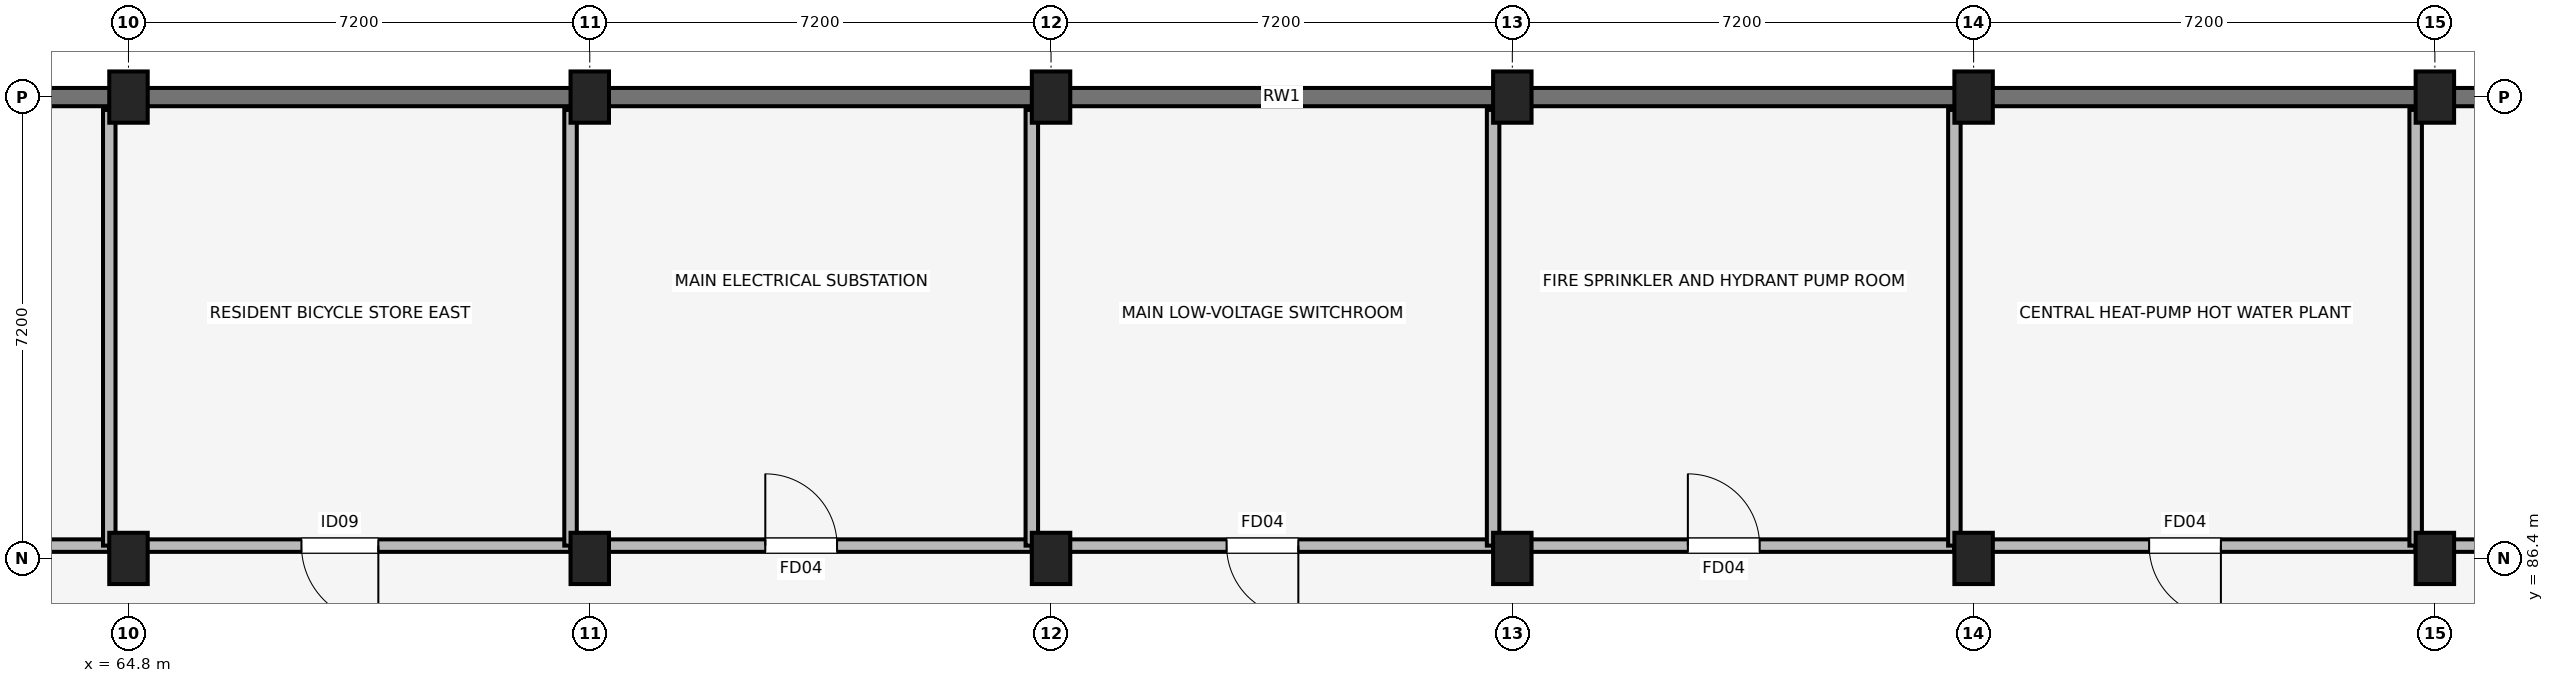
"""IFC4 building model, lengths in metres.
Left out: names, types, materials, properties, quantities, classifications, styles, units other than length and angle.
Written with IfcOpenShell. Run it as: python <this file> out.ifc"""

import sys

from ifc_helpers import new_model, si_unit, direction, frame, frame_2d, origin, origin_2d, place, context, subcontext, project, spatial, rectangle, extrude, element, fill, save


model = new_model("IFC4")
c1 = context("Model", 3, precision=1e-05, world=origin(), true_north=direction((0.0, 1.0)))
c2 = subcontext(c1, "Body", "Model", "MODEL_VIEW")
j1 = project(units=[si_unit("LENGTHUNIT", "METRE"), si_unit("PLANEANGLEUNIT", "RADIAN")], contexts=[c1])
p1 = place(None, origin())
s1 = spatial("IfcSite", under=j1, at=p1, CompositionType="ELEMENT")
p2 = place(p1, origin())
s2 = spatial("IfcBuilding", under=s1, at=p2, CompositionType="ELEMENT")
p3 = place(p2, frame((0.0, 0.0, -3.6)))
s3 = spatial("IfcBuildingStorey", under=s2, at=p3, CompositionType="ELEMENT", Elevation=-3.6)
p4 = place(p3, frame((-0.143, 93.6, 0.0), z_axis=(0.0, 0.0, 1.0), x_axis=(1.0, 0.0, 0.0)))
e1 = element("IfcWall", 1, at=p4, inside=s3, PredefinedType="USERDEFINED", context=c2, shape_type="SweptSolid", body=[
    extrude(rectangle(XDim=165.885, YDim=0.285, at=frame_2d((82.942, 0.0))), origin(), (0.0, 0.0, 1.0), 3.6),
])
for number, where, z_axis, x_axis in (
    (2, (64.8, 86.4, -0.26), (0.0, 0.0, 1.0), (1.0, 0.0, 0.0)),
    (3, (64.8, 93.6, -0.26), (0.0, 0.0, 1.0), (1.0, 0.0, 0.0)),
    (4, (72.0, 86.4, -0.26), (0.0, 0.0, 1.0), (1.0, 0.0, 0.0)),
    (5, (72.0, 93.6, -0.26), (0.0, 0.0, 1.0), (1.0, 0.0, 0.0)),
    (6, (79.2, 86.4, -0.26), (0.0, 0.0, 1.0), (1.0, 0.0, 0.0)),
    (7, (79.2, 93.6, -0.26), (0.0, 0.0, 1.0), (1.0, 0.0, 0.0)),
    (8, (86.4, 86.4, -0.26), (0.0, 0.0, 1.0), (1.0, 0.0, 0.0)),
    (9, (86.4, 93.6, -0.26), (0.0, 0.0, 1.0), (1.0, 0.0, 0.0)),
    (10, (93.6, 86.4, -0.26), (0.0, 0.0, 1.0), (1.0, 0.0, 0.0)),
    (11, (93.6, 93.6, -0.26), (0.0, 0.0, 1.0), (1.0, 0.0, 0.0)),
    (12, (100.8, 86.4, -0.26), (0.0, 0.0, 1.0), (1.0, 0.0, 0.0)),
    (13, (100.8, 93.6, -0.26), (0.0, 0.0, 1.0), (1.0, 0.0, 0.0)),
):
    element("IfcColumn", number, at=place(p3, frame(where, z_axis=z_axis, x_axis=x_axis)), inside=s3, PredefinedType="COLUMN", context=c2, shape_type="SweptSolid", body=[
        extrude(rectangle(XDim=0.6, YDim=0.8, at=origin_2d()), origin(), (0.0, 0.0, 1.0), 3.86),
    ])
p5 = place(p3, frame((58.2, 86.6, 0.0), z_axis=(0.0, 0.0, 1.0), x_axis=(1.0, 0.0, 0.0)))
e14 = element("IfcWall", 14, at=p5, inside=s3, PredefinedType="PARTITIONING", context=c2, shape_type="SweptSolid", body=[
    extrude(rectangle(XDim=6.3, YDim=0.195, at=frame_2d((3.15, 0.0))), origin(), (0.0, 0.0, 1.0), 2.28),
])
p6 = place(p5, frame((2.55, 0.0, 0.0)))
e15 = element("IfcOpeningElement", 15, at=p6, cuts=e14, PredefinedType="OPENING", context=c2, shape_type="SweptSolid", body=[
    extrude(rectangle(XDim=1.2, YDim=2.18, at=frame_2d((0.6, 1.09))), frame((0.0, 0.107, 0.0), z_axis=(0.0, -1.0, 0.0), x_axis=(1.0, 0.0, 0.0)), (0.0, 0.0, 1.0), 0.215),
])
p7 = place(p3, frame((64.5, 86.6, 0.0), z_axis=(0.0, 0.0, 1.0), x_axis=(1.0, 0.0, 0.0)))
e16 = element("IfcWall", 16, at=p7, inside=s3, PredefinedType="PARTITIONING", context=c2, shape_type="SweptSolid", body=[
    extrude(rectangle(XDim=7.2, YDim=0.195, at=frame_2d((3.6, 0.0))), origin(), (0.0, 0.0, 1.0), 2.28),
])
p8 = place(p7, frame((4.2, 0.0, 0.0), z_axis=(0.0, 0.0, 1.0), x_axis=(-1.0, 0.0, 0.0)))
e17 = element("IfcOpeningElement", 17, at=p8, cuts=e16, PredefinedType="OPENING", context=c2, shape_type="SweptSolid", body=[
    extrude(rectangle(XDim=1.2, YDim=2.18, at=frame_2d((0.6, 1.09))), frame((0.0, 0.107, 0.0), z_axis=(0.0, -1.0, 0.0), x_axis=(1.0, 0.0, 0.0)), (0.0, 0.0, 1.0), 0.215),
])
p9 = place(p3, frame((71.7, 86.6, 0.0), z_axis=(0.0, 0.0, 1.0), x_axis=(1.0, 0.0, 0.0)))
e18 = element("IfcWall", 18, at=p9, inside=s3, PredefinedType="PARTITIONING", context=c2, shape_type="SweptSolid", body=[
    extrude(rectangle(XDim=7.2, YDim=0.195, at=frame_2d((3.6, 0.0))), origin(), (0.0, 0.0, 1.0), 2.25),
])
p10 = place(p9, frame((3.04, 0.0, 0.0)))
e19 = element("IfcOpeningElement", 19, at=p10, cuts=e18, PredefinedType="OPENING", context=c2, shape_type="SweptSolid", body=[
    extrude(rectangle(XDim=1.12, YDim=2.15, at=frame_2d((0.56, 1.075))), frame((0.0, 0.107, 0.0), z_axis=(0.0, -1.0, 0.0), x_axis=(1.0, 0.0, 0.0)), (0.0, 0.0, 1.0), 0.215),
])
p11 = place(p3, frame((78.9, 86.6, 0.0), z_axis=(0.0, 0.0, 1.0), x_axis=(1.0, 0.0, 0.0)))
e20 = element("IfcWall", 20, at=p11, inside=s3, PredefinedType="PARTITIONING", context=c2, shape_type="SweptSolid", body=[
    extrude(rectangle(XDim=7.2, YDim=0.195, at=frame_2d((3.6, 0.0))), origin(), (0.0, 0.0, 1.0), 2.25),
])
p12 = place(p11, frame((4.16, 0.0, 0.0), z_axis=(0.0, 0.0, 1.0), x_axis=(-1.0, 0.0, 0.0)))
e21 = element("IfcOpeningElement", 21, at=p12, cuts=e20, PredefinedType="OPENING", context=c2, shape_type="SweptSolid", body=[
    extrude(rectangle(XDim=1.12, YDim=2.15, at=frame_2d((0.56, 1.075))), frame((0.0, 0.107, 0.0), z_axis=(0.0, -1.0, 0.0), x_axis=(1.0, 0.0, 0.0)), (0.0, 0.0, 1.0), 0.215),
])
p13 = place(p3, frame((86.1, 86.6, 0.0), z_axis=(0.0, 0.0, 1.0), x_axis=(1.0, 0.0, 0.0)))
e22 = element("IfcWall", 22, at=p13, inside=s3, PredefinedType="PARTITIONING", context=c2, shape_type="SweptSolid", body=[
    extrude(rectangle(XDim=7.2, YDim=0.195, at=frame_2d((3.6, 0.0))), origin(), (0.0, 0.0, 1.0), 2.25),
])
p14 = place(p13, frame((3.04, 0.0, 0.0)))
e23 = element("IfcOpeningElement", 23, at=p14, cuts=e22, PredefinedType="OPENING", context=c2, shape_type="SweptSolid", body=[
    extrude(rectangle(XDim=1.12, YDim=2.15, at=frame_2d((0.56, 1.075))), frame((0.0, 0.107, 0.0), z_axis=(0.0, -1.0, 0.0), x_axis=(1.0, 0.0, 0.0)), (0.0, 0.0, 1.0), 0.215),
])
p15 = place(p3, frame((93.3, 86.6, 0.0), z_axis=(0.0, 0.0, 1.0), x_axis=(1.0, 0.0, 0.0)))
e24 = element("IfcWall", 24, at=p15, inside=s3, PredefinedType="PARTITIONING", context=c2, shape_type="SweptSolid", body=[
    extrude(rectangle(XDim=7.2, YDim=0.195, at=frame_2d((3.6, 0.0))), origin(), (0.0, 0.0, 1.0), 2.25),
])
p16 = place(p15, frame((4.16, 0.0, 0.0), z_axis=(0.0, 0.0, 1.0), x_axis=(-1.0, 0.0, 0.0)))
e25 = element("IfcOpeningElement", 25, at=p16, cuts=e24, PredefinedType="OPENING", context=c2, shape_type="SweptSolid", body=[
    extrude(rectangle(XDim=1.12, YDim=2.15, at=frame_2d((0.56, 1.075))), frame((0.0, 0.107, 0.0), z_axis=(0.0, -1.0, 0.0), x_axis=(1.0, 0.0, 0.0)), (0.0, 0.0, 1.0), 0.215),
])
p17 = place(p3, frame((100.5, 86.6, 0.0), z_axis=(0.0, 0.0, 1.0), x_axis=(1.0, 0.0, 0.0)))
e26 = element("IfcWall", 26, at=p17, inside=s3, PredefinedType="PARTITIONING", context=c2, shape_type="SweptSolid", body=[
    extrude(rectangle(XDim=6.9, YDim=0.195, at=frame_2d((3.45, 0.0))), origin(), (0.0, 0.0, 1.0), 2.25),
])
p18 = place(p17, frame((2.89, 0.0, 0.0)))
e27 = element("IfcOpeningElement", 27, at=p18, cuts=e26, PredefinedType="OPENING", context=c2, shape_type="SweptSolid", body=[
    extrude(rectangle(XDim=1.12, YDim=2.15, at=frame_2d((0.56, 1.075))), frame((0.0, 0.107, 0.0), z_axis=(0.0, -1.0, 0.0), x_axis=(1.0, 0.0, 0.0)), (0.0, 0.0, 1.0), 0.215),
])
for number, where, z_axis, x_axis in (
    (28, (64.5, 86.6, 0.0), (0.0, 0.0, 1.0), (0.0, 1.0, 0.0)),
    (29, (71.7, 86.6, 0.0), (0.0, 0.0, 1.0), (0.0, 1.0, 0.0)),
    (30, (78.9, 86.6, 0.0), (0.0, 0.0, 1.0), (0.0, 1.0, 0.0)),
    (31, (86.1, 86.6, 0.0), (0.0, 0.0, 1.0), (0.0, 1.0, 0.0)),
    (32, (93.3, 86.6, 0.0), (0.0, 0.0, 1.0), (0.0, 1.0, 0.0)),
    (33, (100.5, 86.6, 0.0), (0.0, 0.0, 1.0), (0.0, 1.0, 0.0)),
):
    element("IfcWall", number, at=place(p3, frame(where, z_axis=z_axis, x_axis=x_axis)), inside=s3, PredefinedType="PARTITIONING", context=c2, shape_type="SweptSolid", body=[
        extrude(rectangle(XDim=6.8, YDim=0.195, at=frame_2d((3.4, 0.0))), origin(), (0.0, 0.0, 1.0), 2.2),
    ])
p19 = place(p8, origin())
e34 = element("IfcDoor", 34, at=p19, inside=s3, OperationType="SINGLE_SWING_RIGHT", PredefinedType="DOOR", context=c2, shape_type="SweptSolid", body=[
    extrude(rectangle(XDim=1.2, YDim=2.18, at=frame_2d((0.6, 1.09))), frame((0.0, 0.025, 0.0), z_axis=(0.0, -1.0, 0.0), x_axis=(1.0, 0.0, 0.0)), (0.0, 0.0, 1.0), 0.05),
])
fill(e17, e34)
p20 = place(p10, origin())
e35 = element("IfcDoor", 35, at=p20, inside=s3, OperationType="SINGLE_SWING_LEFT", PredefinedType="DOOR", context=c2, shape_type="SweptSolid", body=[
    extrude(rectangle(XDim=1.12, YDim=2.15, at=frame_2d((0.56, 1.075))), frame((0.0, 0.025, 0.0), z_axis=(0.0, -1.0, 0.0), x_axis=(1.0, 0.0, 0.0)), (0.0, 0.0, 1.0), 0.05),
])
fill(e19, e35)
p21 = place(p12, origin())
e36 = element("IfcDoor", 36, at=p21, inside=s3, OperationType="SINGLE_SWING_RIGHT", PredefinedType="DOOR", context=c2, shape_type="SweptSolid", body=[
    extrude(rectangle(XDim=1.12, YDim=2.15, at=frame_2d((0.56, 1.075))), frame((0.0, 0.025, 0.0), z_axis=(0.0, -1.0, 0.0), x_axis=(1.0, 0.0, 0.0)), (0.0, 0.0, 1.0), 0.05),
])
fill(e21, e36)
p22 = place(p14, origin())
e37 = element("IfcDoor", 37, at=p22, inside=s3, OperationType="SINGLE_SWING_LEFT", PredefinedType="DOOR", context=c2, shape_type="SweptSolid", body=[
    extrude(rectangle(XDim=1.12, YDim=2.15, at=frame_2d((0.56, 1.075))), frame((0.0, 0.025, 0.0), z_axis=(0.0, -1.0, 0.0), x_axis=(1.0, 0.0, 0.0)), (0.0, 0.0, 1.0), 0.05),
])
fill(e23, e37)
p23 = place(p16, origin())
e38 = element("IfcDoor", 38, at=p23, inside=s3, OperationType="SINGLE_SWING_RIGHT", PredefinedType="DOOR", context=c2, shape_type="SweptSolid", body=[
    extrude(rectangle(XDim=1.12, YDim=2.15, at=frame_2d((0.56, 1.075))), frame((0.0, 0.025, 0.0), z_axis=(0.0, -1.0, 0.0), x_axis=(1.0, 0.0, 0.0)), (0.0, 0.0, 1.0), 0.05),
])
fill(e25, e38)
save(model, sys.argv[1])
